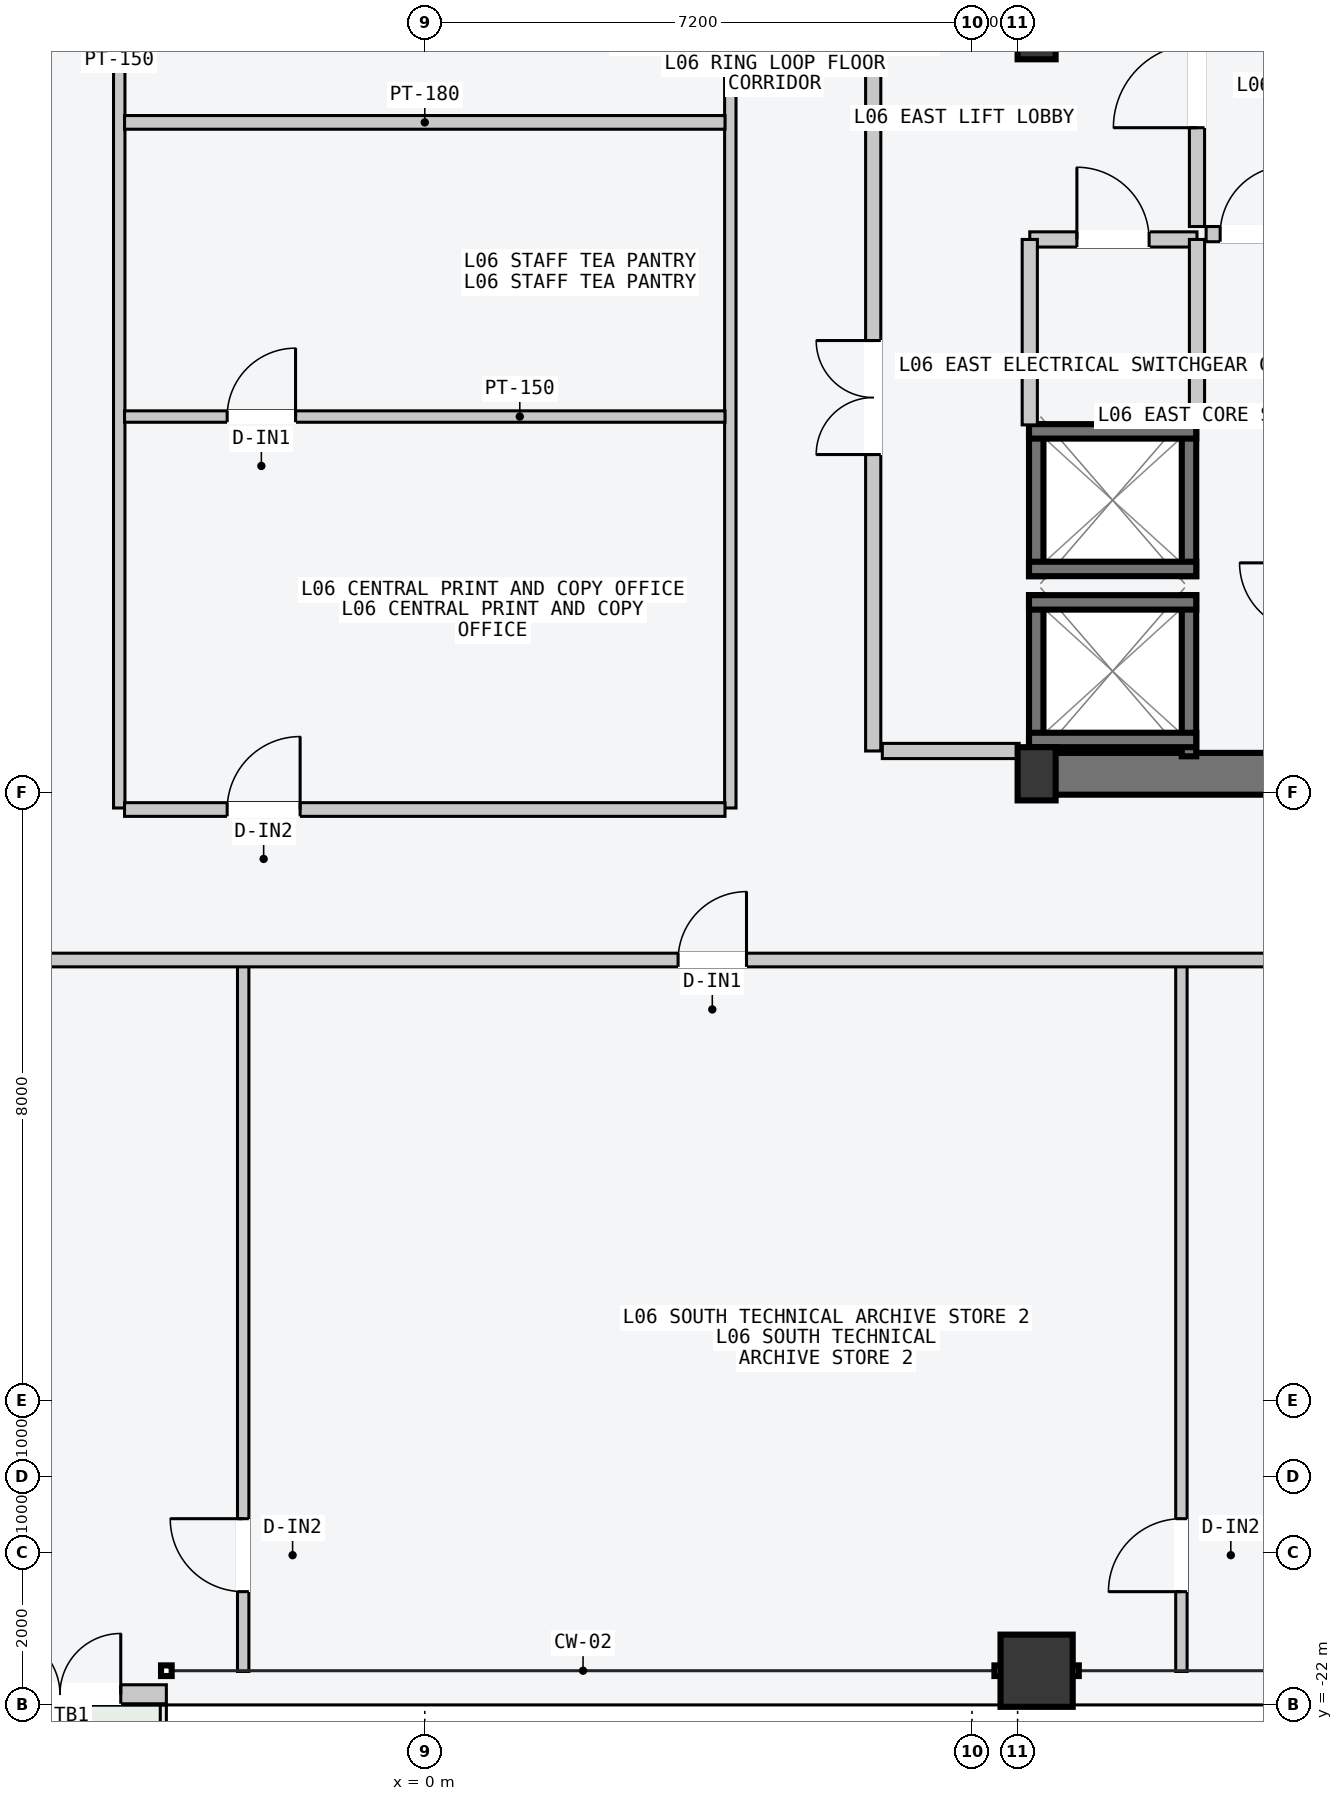
"""IFC4 building model, lengths in metres.
Left out: names, types, materials, properties, quantities, classifications, styles, units other than length and angle.
Written with IfcOpenShell. Run it as: python <this file> out.ifc"""

import sys

from ifc_helpers import new_model, si_unit, direction, frame, frame_2d, origin, origin_2d, place, context, subcontext, project, spatial, rectangle, hollow_rectangle, i_section, extrude, element, fill, save


model = new_model("IFC4")
c1 = context("Model", 3, precision=1e-05, world=origin(), true_north=direction((0.0, 1.0)))
c2 = subcontext(c1, "Body", "Model", "MODEL_VIEW")
j1 = project(units=[si_unit("LENGTHUNIT", "METRE"), si_unit("PLANEANGLEUNIT", "RADIAN")], contexts=[c1])
p1 = place(None, origin())
s1 = spatial("IfcSite", under=j1, at=p1, CompositionType="ELEMENT")
p2 = place(p1, origin())
s2 = spatial("IfcBuilding", under=s1, at=p2, CompositionType="ELEMENT")
p3 = place(p2, frame((0.0, 0.0, 27.6)))
s3 = spatial("IfcBuildingStorey", under=s2, at=p3, CompositionType="ELEMENT", Elevation=27.6)
p4 = place(p3, frame((8.07, -9.75, -0.2), z_axis=(0.0, 0.0, 1.0), x_axis=(1.0, 0.0, 0.0)))
e1 = element("IfcWall", 1, at=p4, inside=s3, PredefinedType="SHEAR", context=c2, shape_type="SweptSolid", body=[
    extrude(rectangle(XDim=6.46, YDim=0.55, at=frame_2d((3.23, 0.0))), origin(), (0.0, 0.0, 1.0), 3.6),
])
for number, where, z_axis, x_axis in (
    (2, (8.05, -9.75, 0.0), (0.0, 0.0, 1.0), (1.0, 0.0, 0.0)),
    (3, (8.05, 0.0, 0.0), (0.0, 0.0, 1.0), (1.0, 0.0, 0.0)),
):
    element("IfcColumn", number, at=place(p3, frame(where, z_axis=z_axis, x_axis=x_axis)), inside=s3, PredefinedType="COLUMN", context=c2, shape_type="SweptSolid", body=[
        extrude(i_section(OverallWidth=0.5, OverallDepth=0.7, WebThickness=0.028, FlangeThickness=0.045, at=origin_2d()), origin(), (0.0, 0.0, 1.0), 3.6),
    ])
p5 = place(p3, frame((8.05, -21.55, 0.0), z_axis=(0.0, 0.0, 1.0), x_axis=(1.0, 0.0, 0.0)))
e4 = element("IfcColumn", 4, at=p5, inside=s3, PredefinedType="COLUMN", context=c2, shape_type="SweptSolid", body=[
    extrude(hollow_rectangle(XDim=0.95, YDim=0.95, WallThickness=0.048, at=origin_2d()), origin(), (0.0, 0.0, 1.0), 3.6),
])
p6 = place(p3, frame((-7.555, -21.86, 0.0), z_axis=(0.0, 0.0, 1.0), x_axis=(1.0, 0.0, 0.0)))
e5 = element("IfcWall", 5, at=p6, inside=s3, PredefinedType="STANDARD", context=c2, shape_type="SweptSolid", body=[
    extrude(rectangle(XDim=4.155, YDim=0.25, at=frame_2d((2.078, 0.0))), origin(), (0.0, 0.0, 1.0), 3.4),
])
p7 = place(p6, frame((1.955, 0.0, 0.0)))
e6 = element("IfcOpeningElement", 6, at=p7, cuts=e5, PredefinedType="OPENING", context=c2, shape_type="SweptSolid", body=[
    extrude(rectangle(XDim=1.6, YDim=2.2, at=frame_2d((0.8, 1.1))), frame((0.0, 0.135, 0.0), z_axis=(0.0, -1.0, 0.0), x_axis=(1.0, 0.0, 0.0)), (0.0, 0.0, 1.0), 0.27),
])
for number, where, z_axis, x_axis in (
    (7, (8.045, -9.52, -0.2), (0.0, 0.0, 1.0), (0.0, 1.0, 0.0)),
    (8, (10.055, -9.52, -0.2), (0.0, 0.0, 1.0), (0.0, 1.0, 0.0)),
):
    element("IfcWall", number, at=place(p3, frame(where, z_axis=z_axis, x_axis=x_axis)), inside=s3, PredefinedType="SOLIDWALL", context=c2, shape_type="SweptSolid", body=[
        extrude(rectangle(XDim=2.12, YDim=0.19, at=frame_2d((1.06, 0.0))), origin(), (0.0, 0.0, 1.0), 3.6),
    ])
for number, where, z_axis, x_axis in (
    (9, (7.95, -7.495, -0.2), (0.0, 0.0, 1.0), (1.0, 0.0, 0.0)),
    (10, (7.95, -9.305, -0.2), (0.0, 0.0, 1.0), (1.0, 0.0, 0.0)),
):
    element("IfcWall", number, at=place(p3, frame(where, z_axis=z_axis, x_axis=x_axis)), inside=s3, PredefinedType="SOLIDWALL", context=c2, shape_type="SweptSolid", body=[
        extrude(rectangle(XDim=2.2, YDim=0.19, at=frame_2d((1.1, 0.0))), origin(), (0.0, 0.0, 1.0), 3.6),
    ])
for number, where, z_axis, x_axis in (
    (11, (8.045, -7.15, -0.2), (0.0, 0.0, 1.0), (0.0, 1.0, 0.0)),
    (12, (10.055, -7.15, -0.2), (0.0, 0.0, 1.0), (0.0, 1.0, 0.0)),
):
    element("IfcWall", number, at=place(p3, frame(where, z_axis=z_axis, x_axis=x_axis)), inside=s3, PredefinedType="SOLIDWALL", context=c2, shape_type="SweptSolid", body=[
        extrude(rectangle(XDim=2.0, YDim=0.19, at=frame_2d((1.0, 0.0))), origin(), (0.0, 0.0, 1.0), 3.6),
    ])
for number, where, z_axis, x_axis in (
    (13, (7.95, -5.245, -0.2), (0.0, 0.0, 1.0), (1.0, 0.0, 0.0)),
    (14, (7.95, -7.055, -0.2), (0.0, 0.0, 1.0), (1.0, 0.0, 0.0)),
):
    element("IfcWall", number, at=place(p3, frame(where, z_axis=z_axis, x_axis=x_axis)), inside=s3, PredefinedType="SOLIDWALL", context=c2, shape_type="SweptSolid", body=[
        extrude(rectangle(XDim=2.2, YDim=0.19, at=frame_2d((1.1, 0.0))), origin(), (0.0, 0.0, 1.0), 3.6),
    ])
p8 = place(p3, frame((5.9, -9.45, 0.0), z_axis=(0.0, 0.0, 1.0), x_axis=(0.0, 1.0, 0.0)))
e15 = element("IfcWall", 15, at=p8, inside=s3, PredefinedType="PARTITIONING", context=c2, shape_type="SweptSolid", body=[
    extrude(rectangle(XDim=18.9, YDim=0.2, at=frame_2d((9.45, 0.0))), origin(), (0.0, 0.0, 1.0), 3.4),
])
p9 = place(p8, frame((3.9, 0.0, 0.0)))
e16 = element("IfcOpeningElement", 16, at=p9, cuts=e15, PredefinedType="OPENING", context=c2, shape_type="SweptSolid", body=[
    extrude(rectangle(XDim=1.5, YDim=2.2, at=frame_2d((0.75, 1.1))), frame((0.0, 0.11, 0.0), z_axis=(0.0, -1.0, 0.0), x_axis=(1.0, 0.0, 0.0)), (0.0, 0.0, 1.0), 0.22),
])
p10 = place(p3, frame((6.02, -9.45, 0.0), z_axis=(0.0, 0.0, 1.0), x_axis=(1.0, 0.0, 0.0)))
e17 = element("IfcWall", 17, at=p10, inside=s3, PredefinedType="PARTITIONING", context=c2, shape_type="SweptSolid", body=[
    extrude(rectangle(XDim=1.8, YDim=0.2, at=frame_2d((0.9, 0.0))), origin(), (0.0, 0.0, 1.0), 3.4),
])
p11 = place(p3, frame((10.16, -2.55, 0.0), z_axis=(0.0, 0.0, 1.0), x_axis=(0.0, 1.0, 0.0)))
e18 = element("IfcWall", 18, at=p11, inside=s3, PredefinedType="PARTITIONING", context=c2, shape_type="SweptSolid", body=[
    extrude(rectangle(XDim=3.4, YDim=0.2, at=frame_2d((1.7, 0.0))), origin(), (0.0, 0.0, 1.0), 3.4),
])
p12 = place(p11, frame((1.3, 0.0, 0.0)))
e19 = element("IfcOpeningElement", 19, at=p12, cuts=e18, PredefinedType="OPENING", context=c2, shape_type="SweptSolid", body=[
    extrude(rectangle(XDim=1.1, YDim=2.15, at=frame_2d((0.55, 1.075))), frame((0.0, 0.11, 0.0), z_axis=(0.0, -1.0, 0.0), x_axis=(1.0, 0.0, 0.0)), (0.0, 0.0, 1.0), 0.22),
])
p13 = place(p3, frame((10.28, -2.65, 0.0), z_axis=(0.0, 0.0, 1.0), x_axis=(1.0, 0.0, 0.0)))
e20 = element("IfcWall", 20, at=p13, inside=s3, PredefinedType="PARTITIONING", context=c2, shape_type="SweptSolid", body=[
    extrude(rectangle(XDim=1.27, YDim=0.2, at=frame_2d((0.635, 0.0))), origin(), (0.0, 0.0, 1.0), 3.4),
])
p14 = place(p13, frame((0.185, 0.0, 0.0)))
e21 = element("IfcOpeningElement", 21, at=p14, cuts=e20, PredefinedType="OPENING", context=c2, shape_type="SweptSolid", body=[
    extrude(rectangle(XDim=0.9, YDim=2.15, at=frame_2d((0.45, 1.075))), frame((0.0, 0.11, 0.0), z_axis=(0.0, -1.0, 0.0), x_axis=(1.0, 0.0, 0.0)), (0.0, 0.0, 1.0), 0.22),
])
p15 = place(p3, frame((7.96, -2.72, 0.0), z_axis=(0.0, 0.0, 1.0), x_axis=(1.0, 0.0, 0.0)))
e22 = element("IfcWall", 22, at=p15, inside=s3, PredefinedType="PARTITIONING", context=c2, shape_type="SweptSolid", body=[
    extrude(rectangle(XDim=2.2, YDim=0.2, at=frame_2d((1.1, 0.0))), origin(), (0.0, 0.0, 1.0), 3.4),
])
p16 = place(p15, frame((0.62, 0.0, 0.0)))
e23 = element("IfcOpeningElement", 23, at=p16, cuts=e22, PredefinedType="OPENING", context=c2, shape_type="SweptSolid", body=[
    extrude(rectangle(XDim=0.95, YDim=2.1, at=frame_2d((0.475, 1.05))), frame((0.0, 0.11, 0.0), z_axis=(0.0, -1.0, 0.0), x_axis=(1.0, 0.0, 0.0)), (0.0, 0.0, 1.0), 0.22),
])
for number, where, z_axis, x_axis in (
    (24, (7.96, -5.16, 0.0), (0.0, 0.0, 1.0), (0.0, 1.0, 0.0)),
    (25, (10.16, -5.16, 0.0), (0.0, 0.0, 1.0), (0.0, 1.0, 0.0)),
):
    element("IfcWall", number, at=place(p3, frame(where, z_axis=z_axis, x_axis=x_axis)), inside=s3, PredefinedType="PARTITIONING", context=c2, shape_type="SweptSolid", body=[
        extrude(rectangle(XDim=2.44, YDim=0.2, at=frame_2d((1.22, 0.0))), origin(), (0.0, 0.0, 1.0), 3.4),
    ])
for number, where, z_axis, x_axis in (
    (26, (-4.02, -10.2, 0.0), (0.0, 0.0, 1.0), (0.0, 1.0, 0.0)),
    (27, (4.02, -10.2, 0.0), (0.0, 0.0, 1.0), (0.0, 1.0, 0.0)),
):
    element("IfcWall", number, at=place(p3, frame(where, z_axis=z_axis, x_axis=x_axis)), inside=s3, PredefinedType="PARTITIONING", context=c2, shape_type="SweptSolid", body=[
        extrude(rectangle(XDim=20.4, YDim=0.15, at=frame_2d((10.2, 0.0))), origin(), (0.0, 0.0, 1.0), 3.4),
    ])
p17 = place(p3, frame((-3.95, -1.18, 0.0), z_axis=(0.0, 0.0, 1.0), x_axis=(1.0, 0.0, 0.0)))
e28 = element("IfcWall", 28, at=p17, inside=s3, PredefinedType="PARTITIONING", context=c2, shape_type="SweptSolid", body=[
    extrude(rectangle(XDim=7.9, YDim=0.18, at=frame_2d((3.95, 0.0))), origin(), (0.0, 0.0, 1.0), 3.4),
])
p18 = place(p3, frame((-3.95, -10.22, 0.0), z_axis=(0.0, 0.0, 1.0), x_axis=(1.0, 0.0, 0.0)))
e29 = element("IfcWall", 29, at=p18, inside=s3, PredefinedType="PARTITIONING", context=c2, shape_type="SweptSolid", body=[
    extrude(rectangle(XDim=7.9, YDim=0.18, at=frame_2d((3.95, 0.0))), origin(), (0.0, 0.0, 1.0), 3.4),
])
p19 = place(p18, frame((1.35, 0.0, 0.0)))
e30 = element("IfcOpeningElement", 30, at=p19, cuts=e29, PredefinedType="OPENING", context=c2, shape_type="SweptSolid", body=[
    extrude(rectangle(XDim=0.96, YDim=2.18, at=frame_2d((0.48, 1.09))), frame((0.0, 0.1, 0.0), z_axis=(0.0, -1.0, 0.0), x_axis=(1.0, 0.0, 0.0)), (0.0, 0.0, 1.0), 0.2),
])
p20 = place(p3, frame((-3.95, -5.05, 0.0), z_axis=(0.0, 0.0, 1.0), x_axis=(1.0, 0.0, 0.0)))
e31 = element("IfcWall", 31, at=p20, inside=s3, PredefinedType="PARTITIONING", context=c2, shape_type="SweptSolid", body=[
    extrude(rectangle(XDim=7.9, YDim=0.15, at=frame_2d((3.95, 0.0))), origin(), (0.0, 0.0, 1.0), 3.4),
])
p21 = place(p20, frame((1.35, 0.0, 0.0)))
e32 = element("IfcOpeningElement", 32, at=p21, cuts=e31, PredefinedType="OPENING", context=c2, shape_type="SweptSolid", body=[
    extrude(rectangle(XDim=0.9, YDim=2.15, at=frame_2d((0.45, 1.075))), frame((0.0, 0.085, 0.0), z_axis=(0.0, -1.0, 0.0), x_axis=(1.0, 0.0, 0.0)), (0.0, 0.0, 1.0), 0.17),
])
p22 = place(p3, frame((-2.389, -21.56, 0.0), z_axis=(0.0, 0.0, 1.0), x_axis=(0.0, 1.0, 0.0)))
e33 = element("IfcWall", 33, at=p22, inside=s3, PredefinedType="PARTITIONING", context=c2, shape_type="SweptSolid", body=[
    extrude(rectangle(XDim=9.3, YDim=0.15, at=frame_2d((4.65, 0.0))), origin(), (0.0, 0.0, 1.0), 3.4),
])
p23 = place(p22, frame((1.05, 0.0, 0.0)))
e34 = element("IfcOpeningElement", 34, at=p23, cuts=e33, PredefinedType="OPENING", context=c2, shape_type="SweptSolid", body=[
    extrude(rectangle(XDim=0.96, YDim=2.18, at=frame_2d((0.48, 1.09))), frame((0.0, 0.085, 0.0), z_axis=(0.0, -1.0, 0.0), x_axis=(1.0, 0.0, 0.0)), (0.0, 0.0, 1.0), 0.17),
])
p24 = place(p3, frame((9.955, -21.56, 0.0), z_axis=(0.0, 0.0, 1.0), x_axis=(0.0, 1.0, 0.0)))
e35 = element("IfcWall", 35, at=p24, inside=s3, PredefinedType="PARTITIONING", context=c2, shape_type="SweptSolid", body=[
    extrude(rectangle(XDim=9.3, YDim=0.15, at=frame_2d((4.65, 0.0))), origin(), (0.0, 0.0, 1.0), 3.4),
])
p25 = place(p24, frame((1.05, 0.0, 0.0)))
e36 = element("IfcOpeningElement", 36, at=p25, cuts=e35, PredefinedType="OPENING", context=c2, shape_type="SweptSolid", body=[
    extrude(rectangle(XDim=0.96, YDim=2.18, at=frame_2d((0.48, 1.09))), frame((0.0, 0.085, 0.0), z_axis=(0.0, -1.0, 0.0), x_axis=(1.0, 0.0, 0.0)), (0.0, 0.0, 1.0), 0.17),
])
p26 = place(p3, frame((-16.8, -12.2, 0.0), z_axis=(0.0, 0.0, 1.0), x_axis=(1.0, 0.0, 0.0)))
e37 = element("IfcWall", 37, at=p26, inside=s3, PredefinedType="PARTITIONING", context=c2, shape_type="SweptSolid", body=[
    extrude(rectangle(XDim=33.6, YDim=0.18, at=frame_2d((16.8, 0.0))), origin(), (0.0, 0.0, 1.0), 3.4),
])
p27 = place(p26, frame((6.505, 0.0, 0.0)))
e38 = element("IfcOpeningElement", 38, at=p27, cuts=e37, PredefinedType="OPENING", context=c2, shape_type="SweptSolid", body=[
    extrude(rectangle(XDim=1.4, YDim=2.2, at=frame_2d((0.7, 1.1))), frame((0.0, 0.1, 0.0), z_axis=(0.0, -1.0, 0.0), x_axis=(1.0, 0.0, 0.0)), (0.0, 0.0, 1.0), 0.2),
])
p28 = place(p26, frame((20.133, 0.0, 0.0)))
e39 = element("IfcOpeningElement", 39, at=p28, cuts=e37, PredefinedType="OPENING", context=c2, shape_type="SweptSolid", body=[
    extrude(rectangle(XDim=0.9, YDim=2.15, at=frame_2d((0.45, 1.075))), frame((0.0, 0.1, 0.0), z_axis=(0.0, -1.0, 0.0), x_axis=(1.0, 0.0, 0.0)), (0.0, 0.0, 1.0), 0.2),
])
p29 = place(p26, frame((29.698, 0.0, 0.0)))
e40 = element("IfcOpeningElement", 40, at=p29, cuts=e37, PredefinedType="OPENING", context=c2, shape_type="SweptSolid", body=[
    extrude(rectangle(XDim=0.96, YDim=2.18, at=frame_2d((0.48, 1.09))), frame((0.0, 0.1, 0.0), z_axis=(0.0, -1.0, 0.0), x_axis=(1.0, 0.0, 0.0)), (0.0, 0.0, 1.0), 0.2),
])
p30 = place(p7, origin())
e41 = element("IfcDoor", 41, at=p30, inside=s3, OperationType="DOUBLE_DOOR_SINGLE_SWING", PredefinedType="DOOR", context=c2, shape_type="SweptSolid", body=[
    extrude(rectangle(XDim=1.6, YDim=2.2, at=frame_2d((0.8, 1.1))), frame((0.0, 0.025, 0.0), z_axis=(0.0, -1.0, 0.0), x_axis=(1.0, 0.0, 0.0)), (0.0, 0.0, 1.0), 0.05),
])
fill(e6, e41)
p31 = place(p9, origin())
e42 = element("IfcDoor", 42, at=p31, inside=s3, OperationType="DOUBLE_DOOR_SINGLE_SWING", PredefinedType="DOOR", context=c2, shape_type="SweptSolid", body=[
    extrude(rectangle(XDim=1.5, YDim=2.2, at=frame_2d((0.75, 1.1))), frame((0.0, 0.025, 0.0), z_axis=(0.0, -1.0, 0.0), x_axis=(1.0, 0.0, 0.0)), (0.0, 0.0, 1.0), 0.05),
])
fill(e16, e42)
p32 = place(p12, origin())
e43 = element("IfcDoor", 43, at=p32, inside=s3, OperationType="SINGLE_SWING_LEFT", PredefinedType="DOOR", context=c2, shape_type="SweptSolid", body=[
    extrude(rectangle(XDim=1.1, YDim=2.15, at=frame_2d((0.55, 1.075))), frame((0.0, 0.025, 0.0), z_axis=(0.0, -1.0, 0.0), x_axis=(1.0, 0.0, 0.0)), (0.0, 0.0, 1.0), 0.05),
])
fill(e19, e43)
p33 = place(p14, origin())
e44 = element("IfcDoor", 44, at=p33, inside=s3, OperationType="SINGLE_SWING_RIGHT", PredefinedType="DOOR", context=c2, shape_type="SweptSolid", body=[
    extrude(rectangle(XDim=0.9, YDim=2.15, at=frame_2d((0.45, 1.075))), frame((0.0, 0.025, 0.0), z_axis=(0.0, -1.0, 0.0), x_axis=(1.0, 0.0, 0.0)), (0.0, 0.0, 1.0), 0.05),
])
fill(e21, e44)
p34 = place(p16, origin())
e45 = element("IfcDoor", 45, at=p34, inside=s3, OperationType="SINGLE_SWING_LEFT", PredefinedType="DOOR", context=c2, shape_type="SweptSolid", body=[
    extrude(rectangle(XDim=0.95, YDim=2.1, at=frame_2d((0.475, 1.05))), frame((0.0, 0.025, 0.0), z_axis=(0.0, -1.0, 0.0), x_axis=(1.0, 0.0, 0.0)), (0.0, 0.0, 1.0), 0.05),
])
fill(e23, e45)
p35 = place(p19, origin())
e46 = element("IfcDoor", 46, at=p35, inside=s3, OperationType="SINGLE_SWING_RIGHT", PredefinedType="DOOR", context=c2, shape_type="SweptSolid", body=[
    extrude(rectangle(XDim=0.96, YDim=2.18, at=frame_2d((0.48, 1.09))), frame((0.0, 0.025, 0.0), z_axis=(0.0, -1.0, 0.0), x_axis=(1.0, 0.0, 0.0)), (0.0, 0.0, 1.0), 0.05),
])
fill(e30, e46)
p36 = place(p21, origin())
e47 = element("IfcDoor", 47, at=p36, inside=s3, OperationType="SINGLE_SWING_RIGHT", PredefinedType="DOOR", context=c2, shape_type="SweptSolid", body=[
    extrude(rectangle(XDim=0.9, YDim=2.15, at=frame_2d((0.45, 1.075))), frame((0.0, 0.025, 0.0), z_axis=(0.0, -1.0, 0.0), x_axis=(1.0, 0.0, 0.0)), (0.0, 0.0, 1.0), 0.05),
])
fill(e32, e47)
p37 = place(p23, origin())
e48 = element("IfcDoor", 48, at=p37, inside=s3, OperationType="SINGLE_SWING_RIGHT", PredefinedType="DOOR", context=c2, shape_type="SweptSolid", body=[
    extrude(rectangle(XDim=0.96, YDim=2.18, at=frame_2d((0.48, 1.09))), frame((0.0, 0.025, 0.0), z_axis=(0.0, -1.0, 0.0), x_axis=(1.0, 0.0, 0.0)), (0.0, 0.0, 1.0), 0.05),
])
fill(e34, e48)
p38 = place(p25, origin())
e49 = element("IfcDoor", 49, at=p38, inside=s3, OperationType="SINGLE_SWING_LEFT", PredefinedType="DOOR", context=c2, shape_type="SweptSolid", body=[
    extrude(rectangle(XDim=0.96, YDim=2.18, at=frame_2d((0.48, 1.09))), frame((0.0, 0.025, 0.0), z_axis=(0.0, -1.0, 0.0), x_axis=(1.0, 0.0, 0.0)), (0.0, 0.0, 1.0), 0.05),
])
fill(e36, e49)
p39 = place(p28, origin())
e50 = element("IfcDoor", 50, at=p39, inside=s3, OperationType="SINGLE_SWING_RIGHT", PredefinedType="DOOR", context=c2, shape_type="SweptSolid", body=[
    extrude(rectangle(XDim=0.9, YDim=2.15, at=frame_2d((0.45, 1.075))), frame((0.0, 0.025, 0.0), z_axis=(0.0, -1.0, 0.0), x_axis=(1.0, 0.0, 0.0)), (0.0, 0.0, 1.0), 0.05),
])
fill(e39, e50)
save(model, sys.argv[1])
